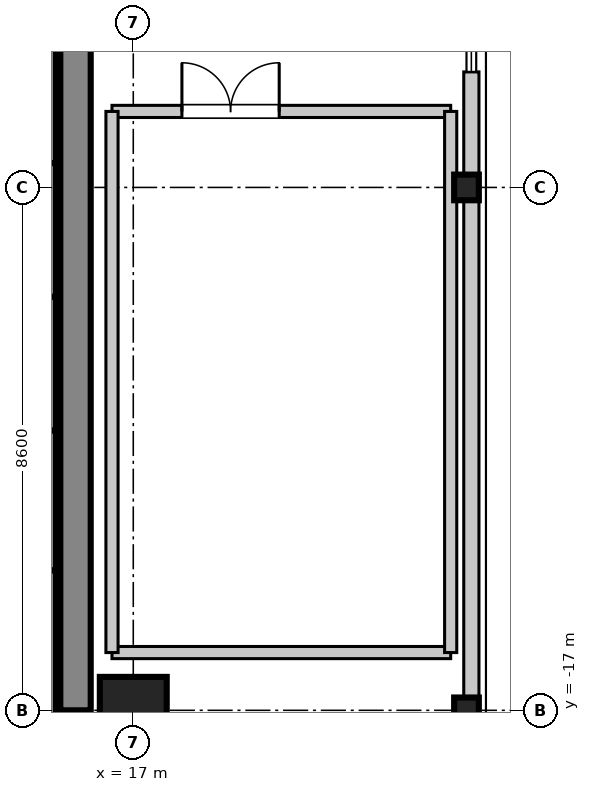
"""IFC4 building model, lengths in metres.
Left out: names, types, materials, properties, quantities, classifications, styles, units other than length and angle.
Written with IfcOpenShell. Run it as: python <this file> out.ifc"""

import sys

from ifc_helpers import new_model, si_unit, direction, frame, frame_2d, origin, origin_2d, place, context, subcontext, project, spatial, rectangle, i_section, extrude, source, transform, mapped, element, fill, save


model = new_model("IFC4")
c1 = context("Model", 3, precision=1e-05, world=origin(), true_north=direction((0.0, 1.0)))
c2 = subcontext(c1, "Body", "Model", "MODEL_VIEW")
j1 = project(units=[si_unit("LENGTHUNIT", "METRE"), si_unit("PLANEANGLEUNIT", "RADIAN")], contexts=[c1])
p1 = place(None, origin())
s1 = spatial("IfcSite", under=j1, at=p1, CompositionType="ELEMENT")
p2 = place(p1, origin())
s2 = spatial("IfcBuilding", under=s1, at=p2, CompositionType="ELEMENT")
p3 = place(p2, frame((0.0, 0.0, 200.1)))
s3 = spatial("IfcBuildingStorey", under=s2, at=p3, CompositionType="ELEMENT", Elevation=200.1)
m1 = source(origin(), c2, "Body", "SweptSolid", [
    extrude(rectangle(XDim=1.1, YDim=1.1, at=origin_2d()), origin(), (0.0, 0.0, 1.0), 4.755),
])
p4 = place(p3, frame((17.0, -17.0, 0.0), z_axis=(0.0, 0.0, 1.0), x_axis=(1.0, 0.0, 0.0)))
e1 = element("IfcColumn", 1, at=p4, inside=s3, PredefinedType="COLUMN", context=c2, shape_type="MappedRepresentation", body=[
    mapped(m1, transform((0.0, 0.0, 0.0), scale=1.0)),
])
m2 = source(origin(), c2, "Body", "SweptSolid", [
    extrude(i_section(OverallWidth=0.406, OverallDepth=0.422, WebThickness=0.019, FlangeThickness=0.03, at=origin_2d()), origin(), (0.0, 0.0, 1.0), 4.861),
])
for number, where, z_axis, x_axis in (
    (2, (22.48, -17.0, 0.0), (0.288, 0.0, 0.958), (0.0, 1.0, 0.0)),
    (3, (22.48, -8.4, 0.0), (0.288, 0.0, 0.958), (0.0, 1.0, 0.0)),
):
    element("IfcColumn", number, at=place(p3, frame(where, z_axis=z_axis, x_axis=x_axis)), inside=s3, PredefinedType="COLUMN", context=c2, shape_type="MappedRepresentation", body=[
        mapped(m2, transform((0.0, 0.0, 0.0), scale=1.0)),
    ])
m3 = source(origin(), c2, "Body", "SweptSolid", [
    extrude(rectangle(XDim=11.6, YDim=0.5, at=frame_2d((5.8, 0.0))), origin(), (0.0, 0.0, 1.0), 4.51),
])
p5 = place(p3, frame((16.05, -17.0, 0.0), z_axis=(0.0, 0.0, 1.0), x_axis=(0.0, 1.0, 0.0)))
e4 = element("IfcWall", 4, at=p5, inside=s3, PredefinedType="SHEAR", context=c2, shape_type="MappedRepresentation", body=[
    mapped(m3, transform((0.0, 0.0, 0.0), scale=1.0)),
])
m4 = source(origin(), c2, "Body", "SweptSolid", [
    extrude(rectangle(XDim=2.36, YDim=0.22, at=frame_2d((1.18, 0.0))), origin(), (0.0, 0.0, 1.0), 4.51),
])
p6 = place(p3, frame((15.62, -8.0, 0.0), z_axis=(0.0, 0.0, 1.0), x_axis=(0.0, 1.0, 0.0)))
e5 = element("IfcWall", 5, at=p6, inside=s3, PredefinedType="SHEAR", context=c2, shape_type="MappedRepresentation", body=[
    mapped(m4, transform((0.0, 0.0, 0.0), scale=1.0)),
])
m5 = source(origin(), c2, "Body", "SweptSolid", [
    extrude(rectangle(XDim=2.2, YDim=0.22, at=frame_2d((1.1, 0.0))), origin(), (0.0, 0.0, 1.0), 4.51),
])
for number, where, z_axis, x_axis in (
    (6, (15.62, -10.2, 0.0), (0.0, 0.0, 1.0), (0.0, 1.0, 0.0)),
    (7, (15.62, -12.4, 0.0), (0.0, 0.0, 1.0), (0.0, 1.0, 0.0)),
):
    element("IfcWall", number, at=place(p3, frame(where, z_axis=z_axis, x_axis=x_axis)), inside=s3, PredefinedType="SHEAR", context=c2, shape_type="MappedRepresentation", body=[
        mapped(m5, transform((0.0, 0.0, 0.0), scale=1.0)),
    ])
m6 = source(origin(), c2, "Body", "SweptSolid", [
    extrude(rectangle(XDim=2.3, YDim=0.22, at=frame_2d((1.15, 0.0))), origin(), (0.0, 0.0, 1.0), 4.51),
])
p7 = place(p3, frame((15.62, -14.7, 0.0), z_axis=(0.0, 0.0, 1.0), x_axis=(0.0, 1.0, 0.0)))
e8 = element("IfcWall", 8, at=p7, inside=s3, PredefinedType="SHEAR", context=c2, shape_type="MappedRepresentation", body=[
    mapped(m6, transform((0.0, 0.0, 0.0), scale=1.0)),
])
m7 = source(origin(), c2, "Body", "SweptSolid", [
    extrude(rectangle(XDim=2.61, YDim=0.22, at=frame_2d((1.305, 0.0))), origin(), (0.0, 0.0, 1.0), 4.51),
])
p8 = place(p3, frame((15.62, -17.31, 0.0), z_axis=(0.0, 0.0, 1.0), x_axis=(0.0, 1.0, 0.0)))
e9 = element("IfcWall", 9, at=p8, inside=s3, PredefinedType="SHEAR", context=c2, shape_type="MappedRepresentation", body=[
    mapped(m7, transform((0.0, 0.0, 0.0), scale=1.0)),
])
m8 = source(origin(), c2, "Body", "SweptSolid", [
    extrude(rectangle(XDim=13.26, YDim=0.25, at=frame_2d((6.63, 0.0))), origin(), (0.0, 0.0, 1.0), 3.99),
])
p9 = place(p3, frame((22.56, -19.76, 0.0), z_axis=(0.0, 0.0, 1.0), x_axis=(0.0, 1.0, 0.0)))
e10 = element("IfcWall", 10, at=p9, inside=s3, PredefinedType="STANDARD", context=c2, shape_type="MappedRepresentation", body=[
    mapped(m8, transform((0.0, 0.0, 0.0), scale=1.0)),
])
m9 = source(origin(), c2, "Body", "SweptSolid", [
    extrude(rectangle(XDim=5.57, YDim=0.2, at=frame_2d((2.785, 0.0))), origin(), (0.0, 0.0, 1.0), 3.4),
])
p10 = place(p3, frame((16.65, -16.05, 0.0), z_axis=(0.0, 0.0, 1.0), x_axis=(1.0, 0.0, 0.0)))
e11 = element("IfcWall", 11, at=p10, inside=s3, PredefinedType="PARTITIONING", context=c2, shape_type="MappedRepresentation", body=[
    mapped(m9, transform((0.0, 0.0, 0.0), scale=1.0)),
])
p11 = place(p3, frame((16.65, -7.15, 0.0), z_axis=(0.0, 0.0, 1.0), x_axis=(1.0, 0.0, 0.0)))
e12 = element("IfcWall", 12, at=p11, inside=s3, PredefinedType="PARTITIONING", context=c2, shape_type="MappedRepresentation", body=[
    mapped(m9, transform((0.0, 0.0, 0.0), scale=1.0)),
])
p12 = place(p11, frame((1.15, 0.0, 0.0)))
e13 = element("IfcOpeningElement", 13, at=p12, cuts=e12, PredefinedType="OPENING", context=c2, shape_type="SweptSolid", body=[
    extrude(rectangle(XDim=1.6, YDim=2.15, at=frame_2d((0.8, 1.075))), frame((0.0, 0.11, 0.0), z_axis=(0.0, -1.0, 0.0), x_axis=(1.0, 0.0, 0.0)), (0.0, 0.0, 1.0), 0.22),
])
m10 = source(origin(), c2, "Body", "SweptSolid", [
    extrude(rectangle(XDim=8.9, YDim=0.2, at=frame_2d((4.45, 0.0))), origin(), (0.0, 0.0, 1.0), 3.4),
])
for number, where, z_axis, x_axis in (
    (14, (16.65, -16.05, 0.0), (0.0, 0.0, 1.0), (0.0, 1.0, 0.0)),
    (15, (22.22, -16.05, 0.0), (0.0, 0.0, 1.0), (0.0, 1.0, 0.0)),
):
    element("IfcWall", number, at=place(p3, frame(where, z_axis=z_axis, x_axis=x_axis)), inside=s3, PredefinedType="PARTITIONING", context=c2, shape_type="MappedRepresentation", body=[
        mapped(m10, transform((0.0, 0.0, 0.0), scale=1.0)),
    ])
m11 = source(origin(), c2, "Body", "SweptSolid", [
    extrude(rectangle(XDim=1.6, YDim=2.15, at=frame_2d((0.8, 1.075))), frame((0.0, 0.025, 0.0), z_axis=(0.0, -1.0, 0.0), x_axis=(1.0, 0.0, 0.0)), (0.0, 0.0, 1.0), 0.05),
])
p13 = place(p12, frame((1.6, 0.0, 0.0), z_axis=(0.0, 0.0, 1.0), x_axis=(-1.0, 0.0, 0.0)))
e16 = element("IfcDoor", 16, at=p13, inside=s3, OperationType="DOUBLE_DOOR_SINGLE_SWING", PredefinedType="DOOR", context=c2, shape_type="MappedRepresentation", body=[
    mapped(m11, transform((0.0, 0.0, 0.0), scale=1.0)),
])
fill(e13, e16)
save(model, sys.argv[1])
